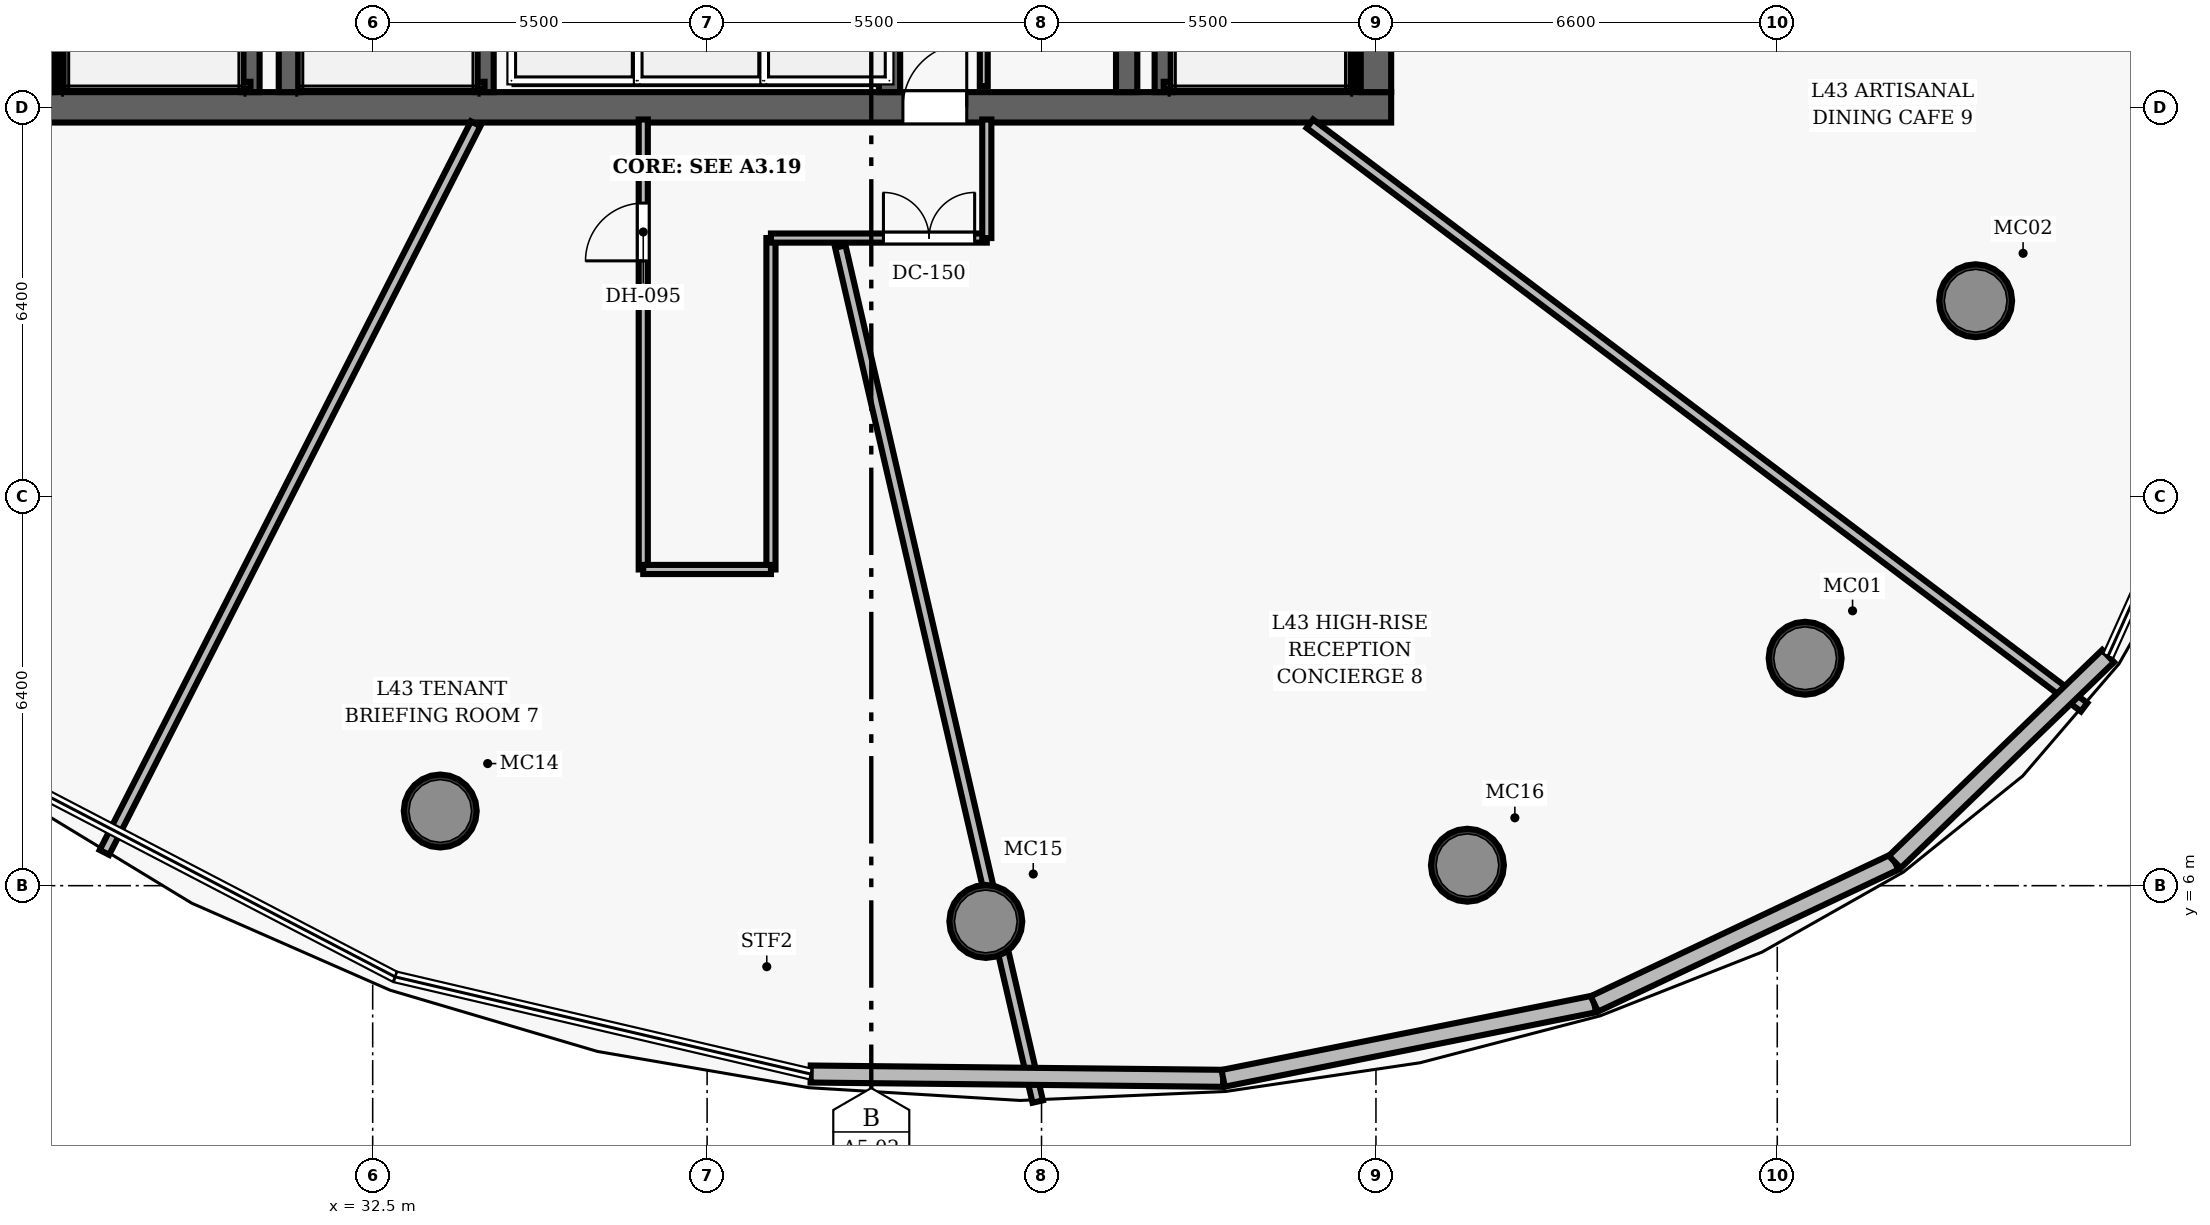
"""IFC4 building model, lengths in metres.
Left out: names, types, materials, properties, quantities, classifications, styles, units other than length and angle.
Written with IfcOpenShell. Run it as: python <this file> out.ifc"""

import sys

from ifc_helpers import new_model, si_unit, direction, frame, frame_2d, origin, origin_2d, place, context, subcontext, project, spatial, rectangle, hollow_circle, extrude, element, fill, save


model = new_model("IFC4")
c1 = context("Model", 3, precision=1e-05, world=origin(), true_north=direction((0.0, 1.0)))
c2 = subcontext(c1, "Body", "Model", "MODEL_VIEW")
j1 = project(units=[si_unit("LENGTHUNIT", "METRE"), si_unit("PLANEANGLEUNIT", "RADIAN")], contexts=[c1])
p1 = place(None, origin())
s1 = spatial("IfcSite", under=j1, at=p1, CompositionType="ELEMENT")
p2 = place(p1, origin())
s2 = spatial("IfcBuilding", under=s1, at=p2, CompositionType="ELEMENT")
p3 = place(p2, frame((0.0, 0.0, 171.2)))
s3 = spatial("IfcBuildingStorey", under=s2, at=p3, CompositionType="ELEMENT", Elevation=171.2)
p4 = place(p3, frame((26.75, 18.8, 0.0), z_axis=(0.0, 0.0, 1.0), x_axis=(1.0, 0.0, 0.0)))
e1 = element("IfcWall", 1, at=p4, inside=s3, PredefinedType="SHEAR", context=c2, shape_type="SweptSolid", body=[
    extrude(rectangle(XDim=22.5, YDim=0.5, at=frame_2d((11.25, 0.0))), origin(), (0.0, 0.0, 1.0), 3.85),
])
p5 = place(p4, frame((14.47, 0.0, 0.0)))
e2 = element("IfcOpeningElement", 2, at=p5, cuts=e1, PredefinedType="OPENING", context=c2, shape_type="SweptSolid", body=[
    extrude(rectangle(XDim=1.05, YDim=2.15, at=frame_2d((0.525, 1.075))), frame((0.0, 0.26, 0.0), z_axis=(0.0, -1.0, 0.0), x_axis=(1.0, 0.0, 0.0)), (0.0, 0.0, 1.0), 0.52),
])
p6 = place(p3, frame((27.0, 19.05, 0.0), z_axis=(0.0, 0.0, 1.0), x_axis=(0.0, 1.0, 0.0)))
e3 = element("IfcWall", 3, at=p6, inside=s3, PredefinedType="SHEAR", context=c2, shape_type="SweptSolid", body=[
    extrude(rectangle(XDim=13.9, YDim=0.5, at=frame_2d((6.95, 0.0))), origin(), (0.0, 0.0, 1.0), 3.85),
])
p7 = place(p6, frame((8.2, 0.0, 0.0)))
e4 = element("IfcOpeningElement", 4, at=p7, cuts=e3, PredefinedType="OPENING", context=c2, shape_type="SweptSolid", body=[
    extrude(rectangle(XDim=1.05, YDim=2.15, at=frame_2d((0.525, 1.075))), frame((0.0, 0.26, 0.0), z_axis=(0.0, -1.0, 0.0), x_axis=(1.0, 0.0, 0.0)), (0.0, 0.0, 1.0), 0.52),
])
p8 = place(p3, frame((49.0, 19.05, 0.0), z_axis=(0.0, 0.0, 1.0), x_axis=(0.0, 1.0, 0.0)))
e5 = element("IfcWall", 5, at=p8, inside=s3, PredefinedType="SHEAR", context=c2, shape_type="SweptSolid", body=[
    extrude(rectangle(XDim=13.9, YDim=0.5, at=frame_2d((6.95, 0.0))), origin(), (0.0, 0.0, 1.0), 3.85),
])
p9 = place(p8, frame((8.2, 0.0, 0.0)))
e6 = element("IfcOpeningElement", 6, at=p9, cuts=e5, PredefinedType="OPENING", context=c2, shape_type="SweptSolid", body=[
    extrude(rectangle(XDim=1.05, YDim=2.15, at=frame_2d((0.525, 1.075))), frame((0.0, 0.26, 0.0), z_axis=(0.0, -1.0, 0.0), x_axis=(1.0, 0.0, 0.0)), (0.0, 0.0, 1.0), 0.52),
])
for number, where, z_axis, x_axis in (
    (7, (31.13, 19.05, 0.0), (0.0, 0.0, 1.0), (0.0, 1.0, 0.0)),
    (8, (44.9, 19.05, 0.0), (0.0, 0.0, 1.0), (0.0, 1.0, 0.0)),
):
    element("IfcWall", number, at=place(p3, frame(where, z_axis=z_axis, x_axis=x_axis)), inside=s3, PredefinedType="SHEAR", context=c2, shape_type="SweptSolid", body=[
        extrude(rectangle(XDim=13.9, YDim=0.35, at=frame_2d((6.95, 0.0))), origin(), (0.0, 0.0, 1.0), 3.85),
    ])
for number, where, z_axis, x_axis in (
    (9, (56.058, 9.74, 0.0), (0.0, 0.0, 1.0), (1.0, 0.0, 0.0)),
    (10, (58.863, 15.619, 0.0), (0.0, 0.0, 1.0), (1.0, 0.0, 0.0)),
    (11, (33.611, 7.228, 0.0), (0.0, 0.0, 1.0), (1.0, 0.0, 0.0)),
    (12, (42.584, 5.412, 0.0), (0.0, 0.0, 1.0), (1.0, 0.0, 0.0)),
    (13, (50.504, 6.336, 0.0), (0.0, 0.0, 1.0), (1.0, 0.0, 0.0)),
):
    element("IfcColumn", number, at=place(p3, frame(where, z_axis=z_axis, x_axis=x_axis)), inside=s3, PredefinedType="COLUMN", context=c2, shape_type="SweptSolid", body=[
        extrude(hollow_circle(Radius=0.6, WallThickness=0.05, at=origin_2d()), origin(), (0.0, 0.0, 1.0), 3.85),
    ])
p10 = place(p3, frame((30.49, 19.05, 0.0), z_axis=(0.0, 0.0, 1.0), x_axis=(0.0, 1.0, 0.0)))
e14 = element("IfcWall", 14, at=p10, inside=s3, PredefinedType="SHEAR", context=c2, shape_type="SweptSolid", body=[
    extrude(rectangle(XDim=7.5, YDim=0.3, at=frame_2d((3.75, 0.0))), origin(), (0.0, 0.0, 1.0), 3.85),
])
p11 = place(p3, frame((27.395, 19.1, 0.0), z_axis=(0.0, 0.0, 1.0), x_axis=(0.0, 1.0, 0.0)))
e15 = element("IfcWall", 15, at=p11, inside=s3, PredefinedType="SHEAR", context=c2, shape_type="SweptSolid", body=[
    extrude(rectangle(XDim=7.45, YDim=0.12, at=frame_2d((3.725, 0.0))), origin(), (0.0, 0.0, 1.0), 3.85),
])
p12 = place(p3, frame((27.395, 19.16, 0.0), z_axis=(0.0, 0.0, 1.0), x_axis=(1.0, 0.0, 0.0)))
e16 = element("IfcWall", 16, at=p12, inside=s3, PredefinedType="SHEAR", context=c2, shape_type="SweptSolid", body=[
    extrude(rectangle(XDim=3.095, YDim=0.12, at=frame_2d((1.547, 0.0))), origin(), (0.0, 0.0, 1.0), 3.85),
])
p13 = place(p3, frame((45.51, 19.05, 0.0), z_axis=(0.0, 0.0, 1.0), x_axis=(0.0, 1.0, 0.0)))
e17 = element("IfcWall", 17, at=p13, inside=s3, PredefinedType="SHEAR", context=c2, shape_type="SweptSolid", body=[
    extrude(rectangle(XDim=7.5, YDim=0.3, at=frame_2d((3.75, 0.0))), origin(), (0.0, 0.0, 1.0), 3.85),
])
p14 = place(p3, frame((48.605, 19.1, 0.0), z_axis=(0.0, 0.0, 1.0), x_axis=(0.0, 1.0, 0.0)))
e18 = element("IfcWall", 18, at=p14, inside=s3, PredefinedType="SHEAR", context=c2, shape_type="SweptSolid", body=[
    extrude(rectangle(XDim=7.45, YDim=0.12, at=frame_2d((3.725, 0.0))), origin(), (0.0, 0.0, 1.0), 3.85),
])
p15 = place(p3, frame((45.51, 19.16, 0.0), z_axis=(0.0, 0.0, 1.0), x_axis=(1.0, 0.0, 0.0)))
e19 = element("IfcWall", 19, at=p15, inside=s3, PredefinedType="SHEAR", context=c2, shape_type="SweptSolid", body=[
    extrude(rectangle(XDim=3.095, YDim=0.12, at=frame_2d((1.547, 0.0))), origin(), (0.0, 0.0, 1.0), 3.85),
])
p16 = place(p3, frame((34.34, 19.05, 0.0), z_axis=(0.0, 0.0, 1.0), x_axis=(0.0, 1.0, 0.0)))
e20 = element("IfcWall", 20, at=p16, inside=s3, PredefinedType="SHEAR", context=c2, shape_type="SweptSolid", body=[
    extrude(rectangle(XDim=7.5, YDim=0.3, at=frame_2d((3.75, 0.0))), origin(), (0.0, 0.0, 1.0), 3.85),
])
p17 = place(p3, frame((31.3, 19.16, 0.0), z_axis=(0.0, 0.0, 1.0), x_axis=(1.0, 0.0, 0.0)))
e21 = element("IfcWall", 21, at=p17, inside=s3, PredefinedType="SHEAR", context=c2, shape_type="SweptSolid", body=[
    extrude(rectangle(XDim=3.04, YDim=0.12, at=frame_2d((1.52, 0.0))), origin(), (0.0, 0.0, 1.0), 3.85),
])
p18 = place(p3, frame((41.0, 19.05, 0.0), z_axis=(0.0, 0.0, 1.0), x_axis=(0.0, 1.0, 0.0)))
e22 = element("IfcWall", 22, at=p18, inside=s3, PredefinedType="SHEAR", context=c2, shape_type="SweptSolid", body=[
    extrude(rectangle(XDim=2.08, YDim=0.35, at=frame_2d((1.04, 0.0))), origin(), (0.0, 0.0, 1.0), 3.035),
])
p19 = place(p3, frame((42.55, 19.15, 0.0), z_axis=(0.0, 0.0, 1.0), x_axis=(0.0, 1.0, 0.0)))
e23 = element("IfcWall", 23, at=p19, inside=s3, PredefinedType="PARTITIONING", context=c2, shape_type="SweptSolid", body=[
    extrude(rectangle(XDim=2.75, YDim=0.13, at=frame_2d((1.375, 0.0))), origin(), (0.0, 0.0, 1.0), 3.035),
])
p20 = place(p19, frame((0.65, 0.0, 0.0)))
e24 = element("IfcOpeningElement", 24, at=p20, cuts=e23, PredefinedType="OPENING", context=c2, shape_type="SweptSolid", body=[
    extrude(rectangle(XDim=0.85, YDim=2.1, at=frame_2d((0.425, 1.05))), frame((0.0, 0.075, 0.0), z_axis=(0.0, -1.0, 0.0), x_axis=(1.0, 0.0, 0.0)), (0.0, 0.0, 1.0), 0.15),
])
p21 = place(p3, frame((36.95, 11.2, 0.0), z_axis=(0.0, 0.0, 1.0), x_axis=(0.0, 1.0, 0.0)))
e25 = element("IfcWall", 25, at=p21, inside=s3, PredefinedType="PARTITIONING", context=c2, shape_type="SweptSolid", body=[
    extrude(rectangle(XDim=7.4, YDim=0.15, at=frame_2d((3.7, 0.0))), origin(), (0.0, 0.0, 1.0), 3.035),
])
p22 = place(p21, frame((5.075, 0.0, 0.0)))
e26 = element("IfcOpeningElement", 26, at=p22, cuts=e25, PredefinedType="OPENING", context=c2, shape_type="SweptSolid", body=[
    extrude(rectangle(XDim=0.95, YDim=2.15, at=frame_2d((0.475, 1.075))), frame((0.0, 0.085, 0.0), z_axis=(0.0, -1.0, 0.0), x_axis=(1.0, 0.0, 0.0)), (0.0, 0.0, 1.0), 0.17),
])
p23 = place(p3, frame((39.05, 11.2, 0.0), z_axis=(0.0, 0.0, 1.0), x_axis=(0.0, 1.0, 0.0)))
e27 = element("IfcWall", 27, at=p23, inside=s3, PredefinedType="PARTITIONING", context=c2, shape_type="SweptSolid", body=[
    extrude(rectangle(XDim=5.45, YDim=0.15, at=frame_2d((2.725, 0.0))), origin(), (0.0, 0.0, 1.0), 3.035),
])
p24 = place(p3, frame((39.05, 16.65, 0.0), z_axis=(0.0, 0.0, 1.0), x_axis=(1.0, 0.0, 0.0)))
e28 = element("IfcWall", 28, at=p24, inside=s3, PredefinedType="PARTITIONING", context=c2, shape_type="SweptSolid", body=[
    extrude(rectangle(XDim=3.55, YDim=0.15, at=frame_2d((1.775, 0.0))), origin(), (0.0, 0.0, 1.0), 3.035),
])
p25 = place(p24, frame((1.85, 0.0, 0.0)))
e29 = element("IfcOpeningElement", 29, at=p25, cuts=e28, PredefinedType="OPENING", context=c2, shape_type="SweptSolid", body=[
    extrude(rectangle(XDim=1.5, YDim=2.2, at=frame_2d((0.75, 1.1))), frame((0.0, 0.085, 0.0), z_axis=(0.0, -1.0, 0.0), x_axis=(1.0, 0.0, 0.0)), (0.0, 0.0, 1.0), 0.17),
])
p26 = place(p3, frame((42.6, 16.65, 0.0), z_axis=(0.0, 0.0, 1.0), x_axis=(0.0, 1.0, 0.0)))
e30 = element("IfcWall", 30, at=p26, inside=s3, PredefinedType="PARTITIONING", context=c2, shape_type="SweptSolid", body=[
    extrude(rectangle(XDim=1.95, YDim=0.15, at=frame_2d((0.975, 0.0))), origin(), (0.0, 0.0, 1.0), 3.035),
])
p27 = place(p3, frame((36.95, 11.2, 0.0), z_axis=(0.0, 0.0, 1.0), x_axis=(1.0, 0.0, 0.0)))
e31 = element("IfcWall", 31, at=p27, inside=s3, PredefinedType="PARTITIONING", context=c2, shape_type="SweptSolid", body=[
    extrude(rectangle(XDim=2.1, YDim=0.15, at=frame_2d((1.05, 0.0))), origin(), (0.0, 0.0, 1.0), 3.035),
])
p28 = place(p3, frame((34.194, 18.53, 0.0), z_axis=(0.0, 0.0, 1.0), x_axis=(-0.453989957323, -0.891006800563, 0.0)))
e32 = element("IfcWall", 32, at=p28, inside=s3, PredefinedType="PARTITIONING", context=c2, shape_type="SweptSolid", body=[
    extrude(rectangle(XDim=13.449, YDim=0.175, at=frame_2d((6.725, 0.0))), origin(), (0.0, 0.0, 1.0), 3.035),
])
p29 = place(p3, frame((40.191, 16.51, 0.0), z_axis=(0.0, 0.0, 1.0), x_axis=(0.224955887238, -0.974368949011, 0.0)))
e33 = element("IfcWall", 33, at=p29, inside=s3, PredefinedType="PARTITIONING", context=c2, shape_type="SweptSolid", body=[
    extrude(rectangle(XDim=14.43, YDim=0.175, at=frame_2d((7.215, 0.0))), origin(), (0.0, 0.0, 1.0), 3.035),
])
p30 = place(p3, frame((47.913, 18.53, 0.0), z_axis=(0.0, 0.0, 1.0), x_axis=(0.798636382818, -0.601813864944, 0.0)))
e34 = element("IfcWall", 34, at=p30, inside=s3, PredefinedType="PARTITIONING", context=c2, shape_type="SweptSolid", body=[
    extrude(rectangle(XDim=15.944, YDim=0.175, at=frame_2d((7.972, 0.0))), origin(), (0.0, 0.0, 1.0), 3.035),
])
p31 = place(p3, frame((46.487, 2.832, 0.0), z_axis=(0.0, 0.0, 1.0), x_axis=(-0.999945547735, 0.010435591221, 0.0)))
e35 = element("IfcWall", 35, at=p31, inside=s3, PredefinedType="SOLIDWALL", context=c2, shape_type="SweptSolid", body=[
    extrude(rectangle(XDim=6.785, YDim=0.28, at=frame_2d((3.392, 0.0))), origin(), (0.0, 0.0, 1.0), 3.62),
])
p32 = place(p3, frame((52.592, 4.055, 0.0), z_axis=(0.0, 0.0, 1.0), x_axis=(-0.980514262212, -0.196447910649, 0.0)))
e36 = element("IfcWall", 36, at=p32, inside=s3, PredefinedType="SOLIDWALL", context=c2, shape_type="SweptSolid", body=[
    extrude(rectangle(XDim=6.226, YDim=0.28, at=frame_2d((3.113, 0.0))), origin(), (0.0, 0.0, 1.0), 3.62),
])
p33 = place(p3, frame((57.533, 6.39, 0.0), z_axis=(0.0, 0.0, 1.0), x_axis=(-0.904116829372, -0.427285336568, 0.0)))
e37 = element("IfcWall", 37, at=p33, inside=s3, PredefinedType="SOLIDWALL", context=c2, shape_type="SweptSolid", body=[
    extrude(rectangle(XDim=5.465, YDim=0.28, at=frame_2d((2.732, 0.0))), origin(), (0.0, 0.0, 1.0), 3.62),
])
p34 = place(p3, frame((61.041, 9.776, 0.0), z_axis=(0.0, 0.0, 1.0), x_axis=(-0.719537756964, -0.694453321904, 0.0)))
e38 = element("IfcWall", 38, at=p34, inside=s3, PredefinedType="SOLIDWALL", context=c2, shape_type="SweptSolid", body=[
    extrude(rectangle(XDim=4.876, YDim=0.28, at=frame_2d((2.438, 0.0))), origin(), (0.0, 0.0, 1.0), 3.62),
])
p35 = place(p5, origin())
e39 = element("IfcDoor", 39, at=p35, inside=s3, OperationType="SINGLE_SWING_RIGHT", PredefinedType="DOOR", context=c2, shape_type="SweptSolid", body=[
    extrude(rectangle(XDim=1.05, YDim=2.15, at=frame_2d((0.525, 1.075))), frame((0.0, 0.025, 0.0), z_axis=(0.0, -1.0, 0.0), x_axis=(1.0, 0.0, 0.0)), (0.0, 0.0, 1.0), 0.05),
])
fill(e2, e39)
p36 = place(p22, origin())
e40 = element("IfcDoor", 40, at=p36, inside=s3, OperationType="SINGLE_SWING_LEFT", PredefinedType="DOOR", context=c2, shape_type="SweptSolid", body=[
    extrude(rectangle(XDim=0.95, YDim=2.15, at=frame_2d((0.475, 1.075))), frame((0.0, 0.025, 0.0), z_axis=(0.0, -1.0, 0.0), x_axis=(1.0, 0.0, 0.0)), (0.0, 0.0, 1.0), 0.05),
])
fill(e26, e40)
p37 = place(p25, origin())
e41 = element("IfcDoor", 41, at=p37, inside=s3, OperationType="DOUBLE_DOOR_SINGLE_SWING", PredefinedType="DOOR", context=c2, shape_type="SweptSolid", body=[
    extrude(rectangle(XDim=1.5, YDim=2.2, at=frame_2d((0.75, 1.1))), frame((0.0, 0.025, 0.0), z_axis=(0.0, -1.0, 0.0), x_axis=(1.0, 0.0, 0.0)), (0.0, 0.0, 1.0), 0.05),
])
fill(e29, e41)
save(model, sys.argv[1])
